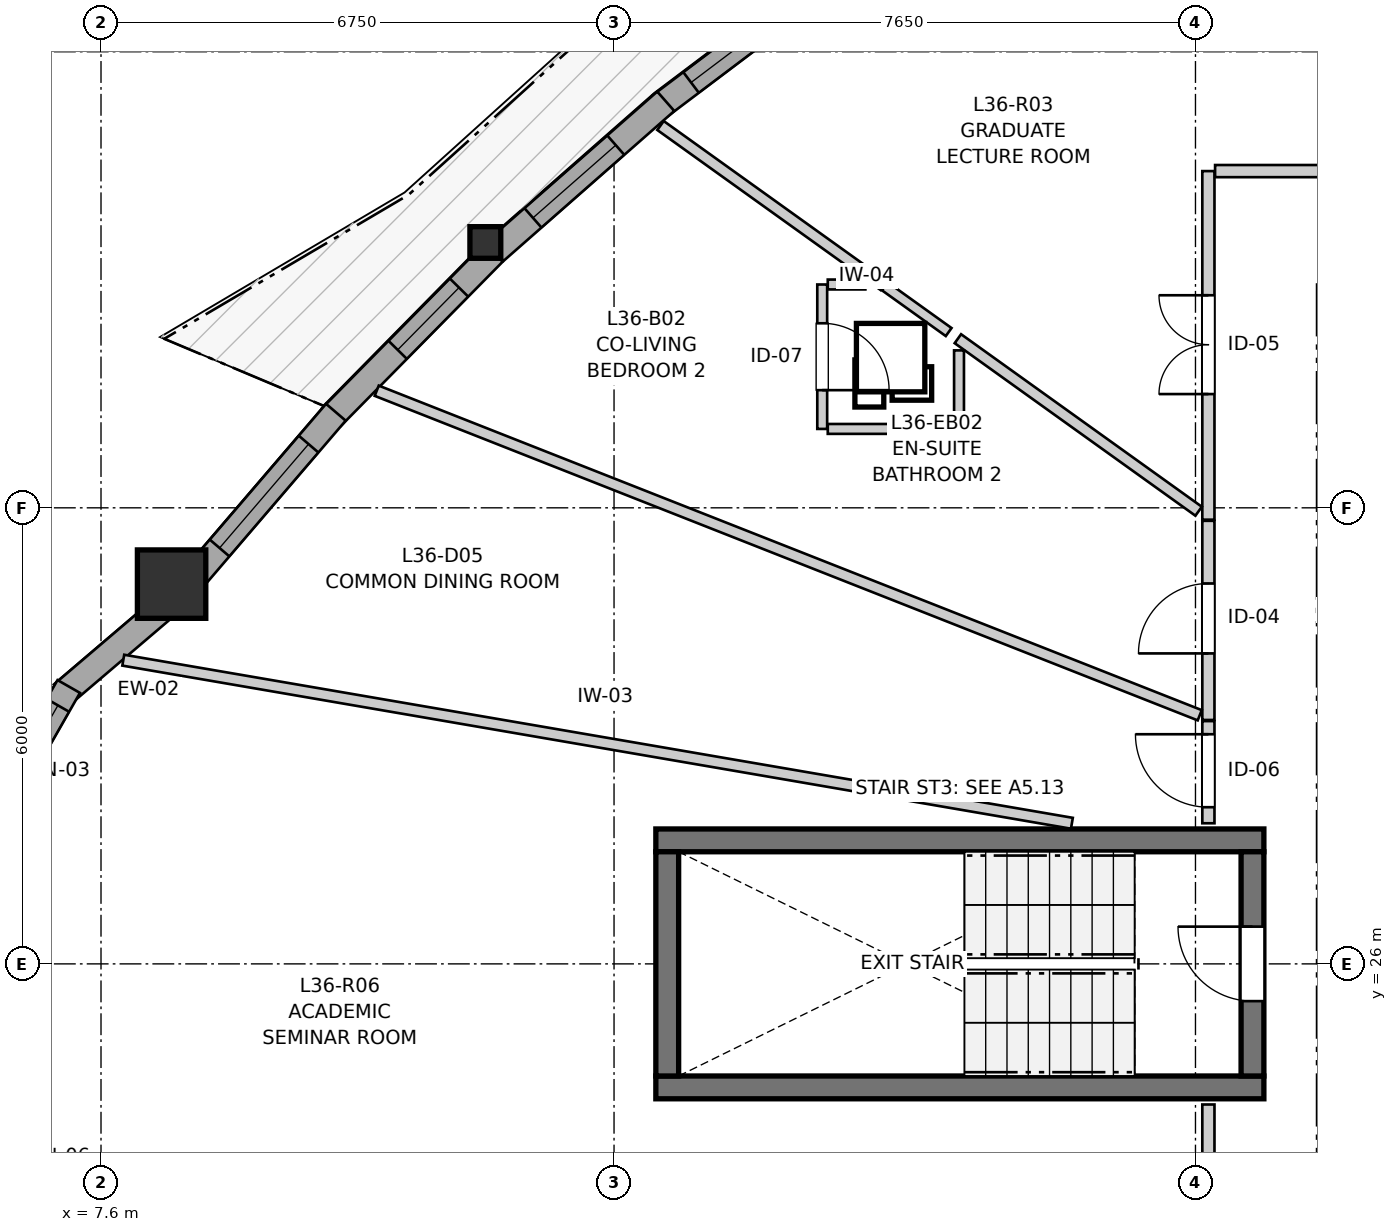
"""IFC4 building model, lengths in metres.
Left out: names, types, materials, properties, quantities, classifications, styles, units other than length and angle.
Written with IfcOpenShell. Run it as: python <this file> out.ifc"""

import sys

from ifc_helpers import new_model, si_unit, direction, frame, frame_2d, origin, origin_2d, place, context, subcontext, project, spatial, rectangle, i_section, extrude, source, transform, mapped, element, fill, save


model = new_model("IFC4")
c1 = context("Model", 3, precision=1e-05, world=origin(), true_north=direction((0.0, 1.0)))
c2 = subcontext(c1, "Body", "Model", "MODEL_VIEW")
j1 = project(units=[si_unit("LENGTHUNIT", "METRE"), si_unit("PLANEANGLEUNIT", "RADIAN")], contexts=[c1])
p1 = place(None, origin())
s1 = spatial("IfcSite", under=j1, at=p1, CompositionType="ELEMENT")
p2 = place(p1, origin())
s2 = spatial("IfcBuilding", under=s1, at=p2, CompositionType="ELEMENT")
p3 = place(p2, frame((0.0, 0.0, 121.6)))
s3 = spatial("IfcBuildingStorey", under=s2, at=p3, CompositionType="ELEMENT", Elevation=121.6)
for number, where, z_axis, x_axis in (
    (1, (14.9, 24.375, 0.0), (0.0, 0.0, 1.0), (1.0, 0.0, 0.0)),
    (2, (22.9, 27.625, 0.0), (0.0, 0.0, 1.0), (-1.0, 0.0, 0.0)),
):
    element("IfcWall", number, at=place(p3, frame(where, z_axis=z_axis, x_axis=x_axis)), inside=s3, PredefinedType="SHEAR", context=c2, shape_type="SweptSolid", body=[
        extrude(rectangle(XDim=8.0, YDim=0.3, at=frame_2d((4.0, 0.0))), origin(), (0.0, 0.0, 1.0), 2.95),
    ])
p4 = place(p3, frame((15.05, 27.475, 0.0), z_axis=(0.0, 0.0, 1.0), x_axis=(0.0, -1.0, 0.0)))
e3 = element("IfcWall", 3, at=p4, inside=s3, PredefinedType="SHEAR", context=c2, shape_type="SweptSolid", body=[
    extrude(rectangle(XDim=2.95, YDim=0.3, at=frame_2d((1.475, 0.0))), origin(), (0.0, 0.0, 1.0), 2.95),
])
p5 = place(p3, frame((22.75, 24.525, 0.0), z_axis=(0.0, 0.0, 1.0), x_axis=(0.0, 1.0, 0.0)))
e4 = element("IfcWall", 4, at=p5, inside=s3, PredefinedType="SHEAR", context=c2, shape_type="SweptSolid", body=[
    extrude(rectangle(XDim=2.95, YDim=0.3, at=frame_2d((1.475, 0.0))), origin(), (0.0, 0.0, 1.0), 2.95),
])
p6 = place(p5, frame((0.985, 0.0, 0.0)))
e5 = element("IfcOpeningElement", 5, at=p6, cuts=e4, PredefinedType="OPENING", context=c2, shape_type="SweptSolid", body=[
    extrude(rectangle(XDim=0.98, YDim=2.15, at=frame_2d((0.49, 1.075))), frame((0.0, 0.16, 0.0), z_axis=(0.0, -1.0, 0.0), x_axis=(1.0, 0.0, 0.0)), (0.0, 0.0, 1.0), 0.32),
])
m1 = source(origin(), c2, "Body", "SweptSolid", [
    extrude(rectangle(XDim=0.9, YDim=0.9, at=origin_2d()), origin(), (0.0, 0.0, 1.0), 2.95),
])
p7 = place(p3, frame((8.529, 30.996, 0.0), z_axis=(0.0, 0.0, 1.0), x_axis=(1.0, 0.0, 0.0)))
e6 = element("IfcColumn", 6, at=p7, inside=s3, PredefinedType="COLUMN", context=c2, shape_type="MappedRepresentation", body=[
    mapped(m1, transform((0.0, 0.0, 0.0), x_axis=(1.0, 0.0, 0.0), y_axis=(0.0, 1.0, 0.0), z_axis=(0.0, 0.0, 1.0), scale=1.0)),
])
m2 = source(origin(), c2, "Body", "SweptSolid", [
    extrude(i_section(OverallWidth=0.406, OverallDepth=0.416, WebThickness=0.027, FlangeThickness=0.044, FilletRadius=0.015, at=origin_2d()), origin(), (0.0, 0.0, 1.0), 2.95),
])
p8 = place(p3, frame((12.657, 35.491, 0.0), z_axis=(0.0, 0.0, 1.0), x_axis=(1.0, 0.0, 0.0)))
e7 = element("IfcColumn", 7, at=p8, inside=s3, PredefinedType="PILASTER", context=c2, shape_type="MappedRepresentation", body=[
    mapped(m2, transform((0.0, 0.0, 0.0), x_axis=(1.0, 0.0, 0.0), y_axis=(0.0, 1.0, 0.0), z_axis=(0.0, 0.0, 1.0), scale=1.0)),
])
p9 = place(p3, frame((8.464, 30.718, 0.0), z_axis=(0.0, 0.0, 1.0), x_axis=(-0.76120118347, -0.648515811899, 0.0)))
e8 = element("IfcWall", 8, at=p9, inside=s3, PredefinedType="SOLIDWALL", context=c2, shape_type="SweptSolid", body=[
    extrude(rectangle(XDim=1.805, YDim=0.34, at=frame_2d((0.902, 0.0))), origin(), (0.0, 0.0, 1.0), 2.48),
])
p10 = place(p3, frame((7.175, 29.65, 0.0), z_axis=(0.0, 0.0, 1.0), x_axis=(-0.495999400124, -0.868322863385, 0.0)))
e9 = element("IfcWall", 9, at=p10, inside=s3, PredefinedType="SOLIDWALL", context=c2, shape_type="SweptSolid", body=[
    extrude(rectangle(XDim=2.073, YDim=0.34, at=frame_2d((1.036, 0.0))), origin(), (0.0, 0.0, 1.0), 2.48),
])
p11 = place(p10, frame((0.286, 0.0, 0.82)))
e10 = element("IfcOpeningElement", 10, at=p11, cuts=e9, PredefinedType="OPENING", context=c2, shape_type="SweptSolid", body=[
    extrude(rectangle(XDim=1.5, YDim=1.45, at=frame_2d((0.75, 0.725))), frame((0.0, 0.18, 0.0), z_axis=(0.0, -1.0, 0.0), x_axis=(1.0, 0.0, 0.0)), (0.0, 0.0, 1.0), 0.36),
])
p12 = place(p3, frame((6.147, 24.15, 0.0), z_axis=(0.0, 0.0, 1.0), x_axis=(0.495999400124, -0.868322863385, 0.0)))
e11 = element("IfcWall", 11, at=p12, inside=s3, PredefinedType="SOLIDWALL", context=c2, shape_type="SweptSolid", body=[
    extrude(rectangle(XDim=2.073, YDim=0.34, at=frame_2d((1.036, 0.0))), origin(), (0.0, 0.0, 1.0), 2.48),
])
p13 = place(p12, frame((0.511, 0.0, 0.82)))
e12 = element("IfcOpeningElement", 12, at=p13, cuts=e11, PredefinedType="OPENING", context=c2, shape_type="SweptSolid", body=[
    extrude(rectangle(XDim=1.05, YDim=1.45, at=frame_2d((0.525, 0.725))), frame((0.0, 0.18, 0.0), z_axis=(0.0, -1.0, 0.0), x_axis=(1.0, 0.0, 0.0)), (0.0, 0.0, 1.0), 0.36),
])
p14 = place(p3, frame((17.154, 38.947, 0.0), z_axis=(0.0, 0.0, 1.0), x_axis=(-0.798332692302, -0.602216665663, 0.0)))
e13 = element("IfcWall", 13, at=p14, inside=s3, PredefinedType="SOLIDWALL", context=c2, shape_type="SweptSolid", body=[
    extrude(rectangle(XDim=2.746, YDim=0.34, at=frame_2d((1.373, 0.0))), origin(), (0.0, 0.0, 1.0), 2.48),
])
p15 = place(p14, frame((0.493, 0.0, 0.82)))
e14 = element("IfcOpeningElement", 14, at=p15, cuts=e13, PredefinedType="OPENING", context=c2, shape_type="SweptSolid", body=[
    extrude(rectangle(XDim=1.75, YDim=1.3, at=frame_2d((0.875, 0.65))), frame((0.0, 0.18, 0.0), z_axis=(0.0, -1.0, 0.0), x_axis=(1.0, 0.0, 0.0)), (0.0, 0.0, 1.0), 0.36),
])
p16 = place(p3, frame((15.031, 37.349, 0.0), z_axis=(0.0, 0.0, 1.0), x_axis=(-0.751472812955, -0.659764057364, 0.0)))
e15 = element("IfcWall", 15, at=p16, inside=s3, PredefinedType="SOLIDWALL", context=c2, shape_type="SweptSolid", body=[
    extrude(rectangle(XDim=2.99, YDim=0.34, at=frame_2d((1.495, 0.0))), origin(), (0.0, 0.0, 1.0), 2.48),
])
p17 = place(p16, frame((0.875, 0.0, 0.82)))
e16 = element("IfcOpeningElement", 16, at=p17, cuts=e15, PredefinedType="OPENING", context=c2, shape_type="SweptSolid", body=[
    extrude(rectangle(XDim=1.45, YDim=1.25, at=frame_2d((0.725, 0.625))), frame((0.0, 0.18, 0.0), z_axis=(0.0, -1.0, 0.0), x_axis=(1.0, 0.0, 0.0)), (0.0, 0.0, 1.0), 0.36),
])
p18 = place(p3, frame((12.764, 35.357, 0.0), z_axis=(0.0, 0.0, 1.0), x_axis=(-0.701906045867, -0.712269543625, 0.0)))
e17 = element("IfcWall", 17, at=p18, inside=s3, PredefinedType="SOLIDWALL", context=c2, shape_type="SweptSolid", body=[
    extrude(rectangle(XDim=3.039, YDim=0.34, at=frame_2d((1.52, 0.0))), origin(), (0.0, 0.0, 1.0), 2.48),
])
p19 = place(p18, frame((0.646, 0.0, 0.82)))
e18 = element("IfcOpeningElement", 18, at=p19, cuts=e17, PredefinedType="OPENING", context=c2, shape_type="SweptSolid", body=[
    extrude(rectangle(XDim=1.15, YDim=1.2, at=frame_2d((0.575, 0.6))), frame((0.0, 0.18, 0.0), z_axis=(0.0, -1.0, 0.0), x_axis=(1.0, 0.0, 0.0)), (0.0, 0.0, 1.0), 0.36),
])
p20 = place(p3, frame((10.69, 33.257, 0.0), z_axis=(0.0, 0.0, 1.0), x_axis=(-0.650763576187, -0.759280427714, 0.0)))
e19 = element("IfcWall", 19, at=p20, inside=s3, PredefinedType="SOLIDWALL", context=c2, shape_type="SweptSolid", body=[
    extrude(rectangle(XDim=2.893, YDim=0.34, at=frame_2d((1.447, 0.0))), origin(), (0.0, 0.0, 1.0), 2.48),
])
p21 = place(p20, frame((0.552, 0.0, 0.82)))
e20 = element("IfcOpeningElement", 20, at=p21, cuts=e19, PredefinedType="OPENING", context=c2, shape_type="SweptSolid", body=[
    extrude(rectangle(XDim=1.8, YDim=1.45, at=frame_2d((0.9, 0.725))), frame((0.0, 0.18, 0.0), z_axis=(0.0, -1.0, 0.0), x_axis=(1.0, 0.0, 0.0)), (0.0, 0.0, 1.0), 0.36),
])
p22 = place(p3, frame((22.17, 19.359, 0.0), z_axis=(0.0, 0.0, 1.0), x_axis=(0.0, 1.0, 0.0)))
e21 = element("IfcWall", 21, at=p22, inside=s3, PredefinedType="PARTITIONING", context=c2, shape_type="SweptSolid", body=[
    extrude(rectangle(XDim=4.791, YDim=0.16, at=frame_2d((2.396, 0.0))), origin(), (0.0, 0.0, 1.0), 2.95),
])
p23 = place(p22, frame((1.445, 0.0, 0.0)))
e22 = element("IfcOpeningElement", 22, at=p23, cuts=e21, PredefinedType="OPENING", context=c2, shape_type="SweptSolid", body=[
    extrude(rectangle(XDim=1.3, YDim=2.1, at=frame_2d((0.65, 1.05))), frame((0.0, 0.09, 0.0), z_axis=(0.0, -1.0, 0.0), x_axis=(1.0, 0.0, 0.0)), (0.0, 0.0, 1.0), 0.18),
])
p24 = place(p3, frame((22.17, 31.844, 0.0), z_axis=(0.0, 0.0, 1.0), x_axis=(0.0, 1.0, 0.0)))
e23 = element("IfcWall", 23, at=p24, inside=s3, PredefinedType="PARTITIONING", context=c2, shape_type="SweptSolid", body=[
    extrude(rectangle(XDim=4.586, YDim=0.16, at=frame_2d((2.293, 0.0))), origin(), (0.0, 0.0, 1.0), 2.95),
])
p25 = place(p24, frame((1.653, 0.0, 0.0)))
e24 = element("IfcOpeningElement", 24, at=p25, cuts=e23, PredefinedType="OPENING", context=c2, shape_type="SweptSolid", body=[
    extrude(rectangle(XDim=1.3, YDim=2.1, at=frame_2d((0.65, 1.05))), frame((0.0, 0.09, 0.0), z_axis=(0.0, -1.0, 0.0), x_axis=(1.0, 0.0, 0.0)), (0.0, 0.0, 1.0), 0.18),
])
p26 = place(p3, frame((22.17, 29.209, 0.0), z_axis=(0.0, 0.0, 1.0), x_axis=(0.0, 1.0, 0.0)))
e25 = element("IfcWall", 25, at=p26, inside=s3, PredefinedType="PARTITIONING", context=c2, shape_type="SweptSolid", body=[
    extrude(rectangle(XDim=2.62, YDim=0.16, at=frame_2d((1.31, 0.0))), origin(), (0.0, 0.0, 1.0), 2.95),
])
p27 = place(p26, frame((0.875, 0.0, 0.0)))
e26 = element("IfcOpeningElement", 26, at=p27, cuts=e25, PredefinedType="OPENING", context=c2, shape_type="SweptSolid", body=[
    extrude(rectangle(XDim=0.92, YDim=2.1, at=frame_2d((0.46, 1.05))), frame((0.0, 0.09, 0.0), z_axis=(0.0, -1.0, 0.0), x_axis=(1.0, 0.0, 0.0)), (0.0, 0.0, 1.0), 0.18),
])
p28 = place(p3, frame((17.089, 34.938, 0.0), z_axis=(0.0, 0.0, 1.0), x_axis=(0.0, -1.0, 0.0)))
e27 = element("IfcWall", 27, at=p28, inside=s3, PredefinedType="PARTITIONING", context=c2, shape_type="SweptSolid", body=[
    extrude(rectangle(XDim=1.9, YDim=0.13, at=frame_2d((0.95, 0.0))), origin(), (0.0, 0.0, 1.0), 2.95),
])
p29 = place(p28, frame((0.51, 0.0, 0.0)))
e28 = element("IfcOpeningElement", 28, at=p29, cuts=e27, PredefinedType="OPENING", context=c2, shape_type="SweptSolid", body=[
    extrude(rectangle(XDim=0.88, YDim=2.05, at=frame_2d((0.44, 1.025))), frame((0.0, 0.075, 0.0), z_axis=(0.0, -1.0, 0.0), x_axis=(1.0, 0.0, 0.0)), (0.0, 0.0, 1.0), 0.15),
])
p30 = place(p3, frame((22.17, 27.85, 0.0), z_axis=(0.0, 0.0, 1.0), x_axis=(0.0, 1.0, 0.0)))
e29 = element("IfcWall", 29, at=p30, inside=s3, PredefinedType="PARTITIONING", context=c2, shape_type="SweptSolid", body=[
    extrude(rectangle(XDim=1.344, YDim=0.16, at=frame_2d((0.672, 0.0))), origin(), (0.0, 0.0, 1.0), 2.95),
])
p31 = place(p30, frame((0.211, 0.0, 0.0)))
e30 = element("IfcOpeningElement", 30, at=p31, cuts=e29, PredefinedType="OPENING", context=c2, shape_type="SweptSolid", body=[
    extrude(rectangle(XDim=0.96, YDim=2.1, at=frame_2d((0.48, 1.05))), frame((0.0, 0.09, 0.0), z_axis=(0.0, -1.0, 0.0), x_axis=(1.0, 0.0, 0.0)), (0.0, 0.0, 1.0), 0.18),
])
p32 = place(p3, frame((7.893, 29.996, 0.0), z_axis=(0.0, 0.0, 1.0), x_axis=(0.985544917876, -0.169414328938, 0.0)))
e31 = element("IfcWall", 31, at=p32, inside=s3, PredefinedType="PARTITIONING", context=c2, shape_type="SweptSolid", body=[
    extrude(rectangle(XDim=12.664, YDim=0.145, at=frame_2d((6.332, 0.0))), origin(), (0.0, 0.0, 1.0), 2.95),
])
p33 = place(p3, frame((11.228, 33.54, 0.0), z_axis=(0.0, 0.0, 1.0), x_axis=(0.930301058265, -0.366796866114, 0.0)))
e32 = element("IfcWall", 32, at=p33, inside=s3, PredefinedType="PARTITIONING", context=c2, shape_type="SweptSolid", body=[
    extrude(rectangle(XDim=11.639, YDim=0.145, at=frame_2d((5.82, 0.0))), origin(), (0.0, 0.0, 1.0), 2.95),
])
p34 = place(p3, frame((22.258, 36.43, 0.0), z_axis=(0.0, 0.0, 1.0), x_axis=(1.0, 0.0, 0.0)))
e33 = element("IfcWall", 33, at=p34, inside=s3, PredefinedType="PARTITIONING", context=c2, shape_type="SweptSolid", body=[
    extrude(rectangle(XDim=4.074, YDim=0.16, at=frame_2d((2.037, 0.0))), origin(), (0.0, 0.0, 1.0), 2.588),
])
p35 = place(p3, frame((18.874, 34.225, 0.0), z_axis=(0.0, 0.0, 1.0), x_axis=(0.812826521731, -0.582505833079, 0.0)))
e34 = element("IfcWall", 34, at=p35, inside=s3, PredefinedType="PARTITIONING", context=c2, shape_type="SweptSolid", body=[
    extrude(rectangle(XDim=3.896, YDim=0.145, at=frame_2d((1.948, 0.0))), origin(), (0.0, 0.0, 1.0), 2.95),
])
p36 = place(p3, frame((14.961, 37.03, 0.0), z_axis=(0.0, 0.0, 1.0), x_axis=(0.812838437321, -0.582489205748, 0.0)))
e35 = element("IfcWall", 35, at=p36, inside=s3, PredefinedType="PARTITIONING", context=c2, shape_type="SweptSolid", body=[
    extrude(rectangle(XDim=3.616, YDim=0.145, at=frame_2d((1.808, 0.0))), origin(), (0.0, 0.0, 1.0), 2.95),
])
p37 = place(p3, frame((17.162, 33.038, 0.0), z_axis=(0.0, 0.0, 1.0), x_axis=(1.0, 0.0, 0.0)))
e36 = element("IfcWall", 36, at=p37, inside=s3, PredefinedType="PARTITIONING", context=c2, shape_type="SweptSolid", body=[
    extrude(rectangle(XDim=1.727, YDim=0.13, at=frame_2d((0.863, 0.0))), origin(), (0.0, 0.0, 1.0), 2.95),
])
p38 = place(p3, frame((18.889, 33.111, 0.0), z_axis=(0.0, 0.0, 1.0), x_axis=(0.0, 1.0, 0.0)))
e37 = element("IfcWall", 37, at=p38, inside=s3, PredefinedType="PARTITIONING", context=c2, shape_type="SweptSolid", body=[
    extrude(rectangle(XDim=0.96, YDim=0.13, at=frame_2d((0.48, 0.0))), origin(), (0.0, 0.0, 1.0), 2.95),
])
p39 = place(p3, frame((17.913, 34.914, 0.0), z_axis=(0.0, 0.0, 1.0), x_axis=(0.812774229327, -0.582578794792, 0.0)))
e38 = element("IfcWall", 38, at=p39, inside=s3, PredefinedType="PARTITIONING", context=c2, shape_type="SweptSolid", body=[
    extrude(rectangle(XDim=1.033, YDim=0.13, at=frame_2d((0.517, 0.0))), origin(), (0.0, 0.0, 1.0), 2.95),
])
p40 = place(p3, frame((17.162, 34.938, 0.0), z_axis=(0.0, 0.0, 1.0), x_axis=(1.0, 0.0, 0.0)))
e39 = element("IfcWall", 39, at=p40, inside=s3, PredefinedType="PARTITIONING", context=c2, shape_type="SweptSolid", body=[
    extrude(rectangle(XDim=0.495, YDim=0.13, at=frame_2d((0.247, 0.0))), origin(), (0.0, 0.0, 1.0), 2.95),
])
m3 = source(origin(), c2, "Body", "SweptSolid", [
    extrude(rectangle(XDim=1.5, YDim=1.45, at=frame_2d((0.75, 0.725))), frame((0.0, 0.03, 0.0), z_axis=(0.0, -1.0, 0.0), x_axis=(1.0, 0.0, 0.0)), (0.0, 0.0, 1.0), 0.06),
])
p41 = place(p11, origin())
e40 = element("IfcWindow", 40, at=p41, inside=s3, PartitioningType="SINGLE_PANEL", PredefinedType="WINDOW", context=c2, shape_type="MappedRepresentation", body=[
    mapped(m3, transform((0.0, 0.0, 0.0), x_axis=(1.0, 0.0, 0.0), y_axis=(0.0, 1.0, 0.0), z_axis=(0.0, 0.0, 1.0), scale=1.0)),
])
fill(e10, e40)
m4 = source(origin(), c2, "Body", "SweptSolid", [
    extrude(rectangle(XDim=1.75, YDim=1.3, at=frame_2d((0.875, 0.65))), frame((0.0, 0.03, 0.0), z_axis=(0.0, -1.0, 0.0), x_axis=(1.0, 0.0, 0.0)), (0.0, 0.0, 1.0), 0.06),
])
p42 = place(p15, origin())
e41 = element("IfcWindow", 41, at=p42, inside=s3, PartitioningType="SINGLE_PANEL", PredefinedType="WINDOW", context=c2, shape_type="MappedRepresentation", body=[
    mapped(m4, transform((0.0, 0.0, 0.0), x_axis=(1.0, 0.0, 0.0), y_axis=(0.0, 1.0, 0.0), z_axis=(0.0, 0.0, 1.0), scale=1.0)),
])
fill(e14, e41)
m5 = source(origin(), c2, "Body", "SweptSolid", [
    extrude(rectangle(XDim=1.45, YDim=1.25, at=frame_2d((0.725, 0.625))), frame((0.0, 0.03, 0.0), z_axis=(0.0, -1.0, 0.0), x_axis=(1.0, 0.0, 0.0)), (0.0, 0.0, 1.0), 0.06),
])
p43 = place(p17, origin())
e42 = element("IfcWindow", 42, at=p43, inside=s3, PartitioningType="SINGLE_PANEL", PredefinedType="WINDOW", context=c2, shape_type="MappedRepresentation", body=[
    mapped(m5, transform((0.0, 0.0, 0.0), x_axis=(1.0, 0.0, 0.0), y_axis=(0.0, 1.0, 0.0), z_axis=(0.0, 0.0, 1.0), scale=1.0)),
])
fill(e16, e42)
m6 = source(origin(), c2, "Body", "SweptSolid", [
    extrude(rectangle(XDim=1.15, YDim=1.2, at=frame_2d((0.575, 0.6))), frame((0.0, 0.03, 0.0), z_axis=(0.0, -1.0, 0.0), x_axis=(1.0, 0.0, 0.0)), (0.0, 0.0, 1.0), 0.06),
])
p44 = place(p19, origin())
e43 = element("IfcWindow", 43, at=p44, inside=s3, PartitioningType="SINGLE_PANEL", PredefinedType="WINDOW", context=c2, shape_type="MappedRepresentation", body=[
    mapped(m6, transform((0.0, 0.0, 0.0), x_axis=(1.0, 0.0, 0.0), y_axis=(0.0, 1.0, 0.0), z_axis=(0.0, 0.0, 1.0), scale=1.0)),
])
fill(e18, e43)
m7 = source(origin(), c2, "Body", "SweptSolid", [
    extrude(rectangle(XDim=1.8, YDim=1.45, at=frame_2d((0.9, 0.725))), frame((0.0, 0.03, 0.0), z_axis=(0.0, -1.0, 0.0), x_axis=(1.0, 0.0, 0.0)), (0.0, 0.0, 1.0), 0.06),
])
p45 = place(p21, origin())
e44 = element("IfcWindow", 44, at=p45, inside=s3, PartitioningType="SINGLE_PANEL", PredefinedType="WINDOW", context=c2, shape_type="MappedRepresentation", body=[
    mapped(m7, transform((0.0, 0.0, 0.0), x_axis=(1.0, 0.0, 0.0), y_axis=(0.0, 1.0, 0.0), z_axis=(0.0, 0.0, 1.0), scale=1.0)),
])
fill(e20, e44)
m8 = source(origin(), c2, "Body", "SweptSolid", [
    extrude(rectangle(XDim=0.98, YDim=2.15, at=frame_2d((0.49, 1.075))), frame((0.0, 0.025, 0.0), z_axis=(0.0, -1.0, 0.0), x_axis=(1.0, 0.0, 0.0)), (0.0, 0.0, 1.0), 0.05),
])
p46 = place(p6, origin())
e45 = element("IfcDoor", 45, at=p46, inside=s3, OperationType="SINGLE_SWING_RIGHT", PredefinedType="DOOR", context=c2, shape_type="MappedRepresentation", body=[
    mapped(m8, transform((0.0, 0.0, 0.0), x_axis=(1.0, 0.0, 0.0), y_axis=(0.0, 1.0, 0.0), z_axis=(0.0, 0.0, 1.0), scale=1.0)),
])
fill(e5, e45)
m9 = source(origin(), c2, "Body", "SweptSolid", [
    extrude(rectangle(XDim=1.3, YDim=2.1, at=frame_2d((0.65, 1.05))), frame((0.0, 0.025, 0.0), z_axis=(0.0, -1.0, 0.0), x_axis=(1.0, 0.0, 0.0)), (0.0, 0.0, 1.0), 0.05),
])
p47 = place(p25, origin())
e46 = element("IfcDoor", 46, at=p47, inside=s3, OperationType="DOUBLE_DOOR_SINGLE_SWING", PredefinedType="DOOR", context=c2, shape_type="MappedRepresentation", body=[
    mapped(m9, transform((0.0, 0.0, 0.0), x_axis=(1.0, 0.0, 0.0), y_axis=(0.0, 1.0, 0.0), z_axis=(0.0, 0.0, 1.0), scale=1.0)),
])
fill(e24, e46)
m10 = source(origin(), c2, "Body", "SweptSolid", [
    extrude(rectangle(XDim=0.92, YDim=2.1, at=frame_2d((0.46, 1.05))), frame((0.0, 0.025, 0.0), z_axis=(0.0, -1.0, 0.0), x_axis=(1.0, 0.0, 0.0)), (0.0, 0.0, 1.0), 0.05),
])
p48 = place(p27, origin())
e47 = element("IfcDoor", 47, at=p48, inside=s3, OperationType="SINGLE_SWING_LEFT", PredefinedType="DOOR", context=c2, shape_type="MappedRepresentation", body=[
    mapped(m10, transform((0.0, 0.0, 0.0), x_axis=(1.0, 0.0, 0.0), y_axis=(0.0, 1.0, 0.0), z_axis=(0.0, 0.0, 1.0), scale=1.0)),
])
fill(e26, e47)
m11 = source(origin(), c2, "Body", "SweptSolid", [
    extrude(rectangle(XDim=0.88, YDim=2.05, at=frame_2d((0.44, 1.025))), frame((0.0, 0.025, 0.0), z_axis=(0.0, -1.0, 0.0), x_axis=(1.0, 0.0, 0.0)), (0.0, 0.0, 1.0), 0.05),
])
p49 = place(p29, origin())
e48 = element("IfcDoor", 48, at=p49, inside=s3, OperationType="SINGLE_SWING_RIGHT", PredefinedType="DOOR", context=c2, shape_type="MappedRepresentation", body=[
    mapped(m11, transform((0.0, 0.0, 0.0), x_axis=(1.0, 0.0, 0.0), y_axis=(0.0, 1.0, 0.0), z_axis=(0.0, 0.0, 1.0), scale=1.0)),
])
fill(e28, e48)
m12 = source(origin(), c2, "Body", "SweptSolid", [
    extrude(rectangle(XDim=0.96, YDim=2.1, at=frame_2d((0.48, 1.05))), frame((0.0, 0.025, 0.0), z_axis=(0.0, -1.0, 0.0), x_axis=(1.0, 0.0, 0.0)), (0.0, 0.0, 1.0), 0.05),
])
p50 = place(p31, origin())
e49 = element("IfcDoor", 49, at=p50, inside=s3, OperationType="SINGLE_SWING_RIGHT", PredefinedType="DOOR", context=c2, shape_type="MappedRepresentation", body=[
    mapped(m12, transform((0.0, 0.0, 0.0), x_axis=(1.0, 0.0, 0.0), y_axis=(0.0, 1.0, 0.0), z_axis=(0.0, 0.0, 1.0), scale=1.0)),
])
fill(e30, e49)
save(model, sys.argv[1])
